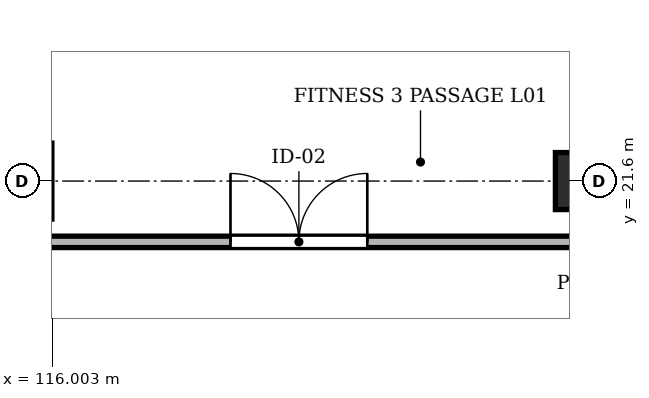
"""IFC4 building model, lengths in metres.
Left out: names, types, materials, properties, quantities, classifications, styles, units other than length and angle.
Written with IfcOpenShell. Run it as: python <this file> out.ifc"""

import sys

from ifc_helpers import new_model, si_unit, direction, frame, frame_2d, origin, origin_2d, place, context, subcontext, project, spatial, rectangle, extrude, element, fill, save


model = new_model("IFC4")
c1 = context("Model", 3, precision=1e-05, world=origin(), true_north=direction((0.0, 1.0)))
c2 = subcontext(c1, "Body", "Model", "MODEL_VIEW")
j1 = project(units=[si_unit("LENGTHUNIT", "METRE"), si_unit("PLANEANGLEUNIT", "RADIAN")], contexts=[c1])
p1 = place(None, origin())
s1 = spatial("IfcSite", under=j1, at=p1, CompositionType="ELEMENT")
p2 = place(p1, origin())
s2 = spatial("IfcBuilding", under=s1, at=p2, CompositionType="ELEMENT")
p3 = place(p2, frame((0.0, 0.0, 4.6)))
s3 = spatial("IfcBuildingStorey", under=s2, at=p3, CompositionType="ELEMENT", Elevation=4.6)
p4 = place(p3, frame((123.0, 21.6, -0.3), z_axis=(0.0, 0.0, 1.0), x_axis=(1.0, 0.0, 0.0)))
e1 = element("IfcColumn", 1, at=p4, inside=s3, PredefinedType="COLUMN", context=c2, shape_type="SweptSolid", body=[
    extrude(rectangle(XDim=0.75, YDim=0.75, at=origin_2d()), origin(), (0.0, 0.0, 1.0), 4.65),
])
p5 = place(p3, frame((108.8, 20.8, 0.0), z_axis=(0.0, 0.0, 1.0), x_axis=(1.0, 0.0, 0.0)))
e2 = element("IfcWall", 2, at=p5, inside=s3, PredefinedType="PARTITIONING", context=c2, shape_type="SweptSolid", body=[
    extrude(rectangle(XDim=28.4, YDim=0.15, at=frame_2d((14.2, 0.0))), origin(), (0.0, 0.0, 1.0), 4.08),
])
p6 = place(p5, frame((9.55, 0.0, 0.0)))
e3 = element("IfcOpeningElement", 3, at=p6, cuts=e2, PredefinedType="OPENING", context=c2, shape_type="SweptSolid", body=[
    extrude(rectangle(XDim=1.8, YDim=2.25, at=frame_2d((0.9, 1.125))), frame((0.0, 0.087, 0.0), z_axis=(0.0, -1.0, 0.0), x_axis=(1.0, 0.0, 0.0)), (0.0, 0.0, 1.0), 0.174),
])
p7 = place(p6, origin())
e4 = element("IfcDoor", 4, at=p7, inside=s3, OperationType="DOUBLE_DOOR_SINGLE_SWING", PredefinedType="DOOR", context=c2, shape_type="SweptSolid", body=[
    extrude(rectangle(XDim=1.8, YDim=2.25, at=frame_2d((0.9, 1.125))), frame((0.0, 0.025, 0.0), z_axis=(0.0, -1.0, 0.0), x_axis=(1.0, 0.0, 0.0)), (0.0, 0.0, 1.0), 0.05),
])
fill(e3, e4)
save(model, sys.argv[1])
